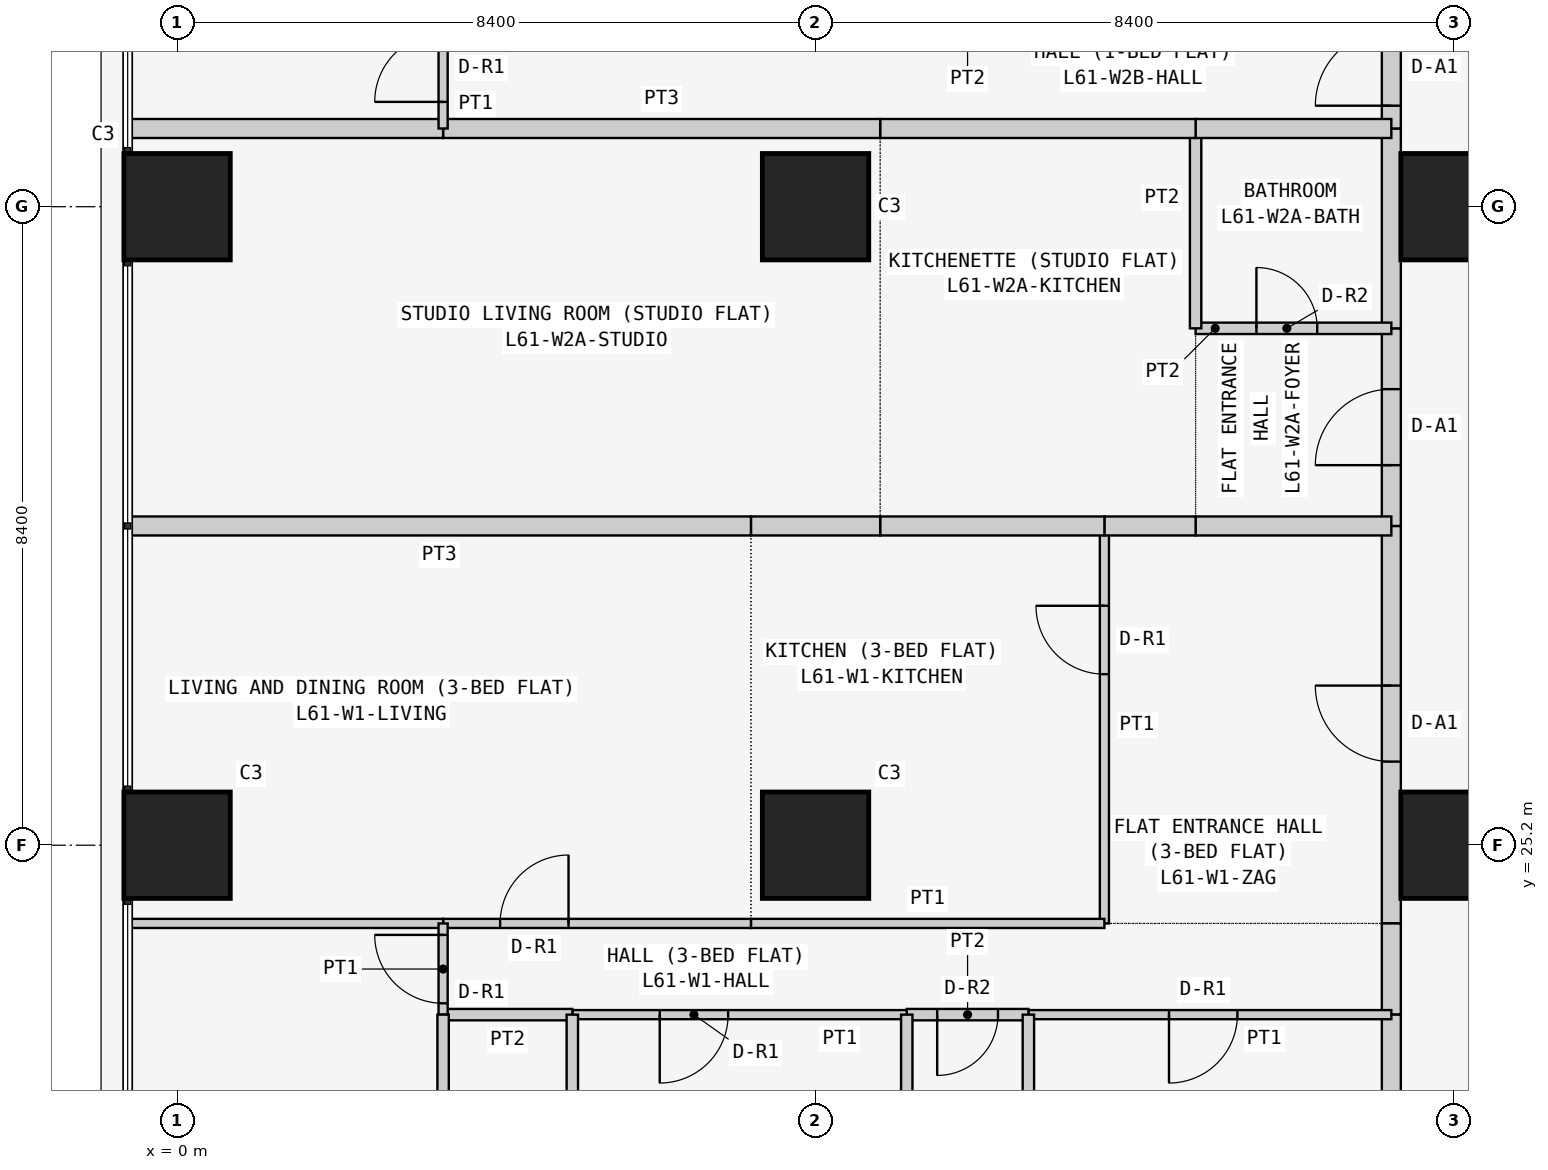
"""IFC4 building model, lengths in metres.
Left out: names, types, materials, properties, quantities, classifications, styles, units other than length and angle.
Written with IfcOpenShell. Run it as: python <this file> out.ifc"""

import sys

from ifc_helpers import new_model, si_unit, direction, frame, frame_2d, origin, origin_2d, place, context, subcontext, project, spatial, rectangle, extrude, element, fill, save


model = new_model("IFC4")
c1 = context("Model", 3, precision=1e-05, world=origin(), true_north=direction((0.0, 1.0)))
c2 = subcontext(c1, "Body", "Model", "MODEL_VIEW")
j1 = project(units=[si_unit("LENGTHUNIT", "METRE"), si_unit("PLANEANGLEUNIT", "RADIAN")], contexts=[c1])
p1 = place(None, origin())
s1 = spatial("IfcSite", under=j1, at=p1, CompositionType="ELEMENT")
p2 = place(p1, origin())
s2 = spatial("IfcBuilding", under=s1, at=p2, CompositionType="ELEMENT")
p3 = place(p2, frame((0.0, 0.0, 233.7)))
s3 = spatial("IfcBuildingStorey", under=s2, at=p3, CompositionType="ELEMENT", Elevation=233.7)
for number, where, z_axis, x_axis in (
    (1, (0.0, 25.2, 0.0), (0.0, 0.0, 1.0), (1.0, 0.0, 0.0)),
    (2, (0.0, 33.6, 0.0), (0.0, 0.0, 1.0), (1.0, 0.0, 0.0)),
    (3, (8.4, 25.2, 0.0), (0.0, 0.0, 1.0), (1.0, 0.0, 0.0)),
    (4, (8.4, 33.6, 0.0), (0.0, 0.0, 1.0), (1.0, 0.0, 0.0)),
    (5, (16.8, 25.2, 0.0), (0.0, 0.0, 1.0), (1.0, 0.0, 0.0)),
    (6, (16.8, 33.6, 0.0), (0.0, 0.0, 1.0), (1.0, 0.0, 0.0)),
):
    element("IfcColumn", number, at=place(p3, frame(where, z_axis=z_axis, x_axis=x_axis)), inside=s3, PredefinedType="COLUMN", context=c2, shape_type="SweptSolid", body=[
        extrude(rectangle(XDim=1.4, YDim=1.4, at=origin_2d()), origin(), (0.0, 0.0, 1.0), 3.6),
    ])
p4 = place(p3, frame((15.975, 24.171, 0.0), z_axis=(0.0, 0.0, 1.0), x_axis=(0.0, 1.0, 0.0)))
e7 = element("IfcWall", 7, at=p4, inside=s3, PredefinedType="PARTITIONING", context=c2, shape_type="SweptSolid", body=[
    extrude(rectangle(XDim=5.229, YDim=0.25, at=frame_2d((2.615, 0.0))), origin(), (0.0, 0.0, 1.0), 3.45),
])
p5 = place(p4, frame((2.129, 0.0, 0.0)))
e8 = element("IfcOpeningElement", 8, at=p5, cuts=e7, PredefinedType="OPENING", context=c2, shape_type="SweptSolid", body=[
    extrude(rectangle(XDim=1.0, YDim=2.1, at=frame_2d((0.5, 1.05))), frame((0.0, 0.135, 0.0), z_axis=(0.0, -1.0, 0.0), x_axis=(1.0, 0.0, 0.0)), (0.0, 0.0, 1.0), 0.27),
])
p6 = place(p3, frame((15.975, 22.971, 0.0), z_axis=(0.0, 0.0, 1.0), x_axis=(0.0, 1.0, 0.0)))
e9 = element("IfcWall", 9, at=p6, inside=s3, PredefinedType="PARTITIONING", context=c2, shape_type="SweptSolid", body=[
    extrude(rectangle(XDim=1.2, YDim=0.25, at=frame_2d((0.6, 0.0))), origin(), (0.0, 0.0, 1.0), 3.45),
])
p7 = place(p3, frame((15.975, 16.1, 0.0), z_axis=(0.0, 0.0, 1.0), x_axis=(0.0, 1.0, 0.0)))
e10 = element("IfcWall", 10, at=p7, inside=s3, PredefinedType="PARTITIONING", context=c2, shape_type="SweptSolid", body=[
    extrude(rectangle(XDim=6.871, YDim=0.25, at=frame_2d((3.436, 0.0))), origin(), (0.0, 0.0, 1.0), 3.45),
])
p8 = place(p3, frame((15.975, 29.4, 0.0), z_axis=(0.0, 0.0, 1.0), x_axis=(0.0, 1.0, 0.0)))
e11 = element("IfcWall", 11, at=p8, inside=s3, PredefinedType="PARTITIONING", context=c2, shape_type="SweptSolid", body=[
    extrude(rectangle(XDim=2.6, YDim=0.25, at=frame_2d((1.3, 0.0))), origin(), (0.0, 0.0, 1.0), 3.45),
])
p9 = place(p8, frame((0.8, 0.0, 0.0)))
e12 = element("IfcOpeningElement", 12, at=p9, cuts=e11, PredefinedType="OPENING", context=c2, shape_type="SweptSolid", body=[
    extrude(rectangle(XDim=1.0, YDim=2.1, at=frame_2d((0.5, 1.05))), frame((0.0, 0.135, 0.0), z_axis=(0.0, -1.0, 0.0), x_axis=(1.0, 0.0, 0.0)), (0.0, 0.0, 1.0), 0.27),
])
p10 = place(p3, frame((15.975, 32.0, 0.0), z_axis=(0.0, 0.0, 1.0), x_axis=(0.0, 1.0, 0.0)))
e13 = element("IfcWall", 13, at=p10, inside=s3, PredefinedType="PARTITIONING", context=c2, shape_type="SweptSolid", body=[
    extrude(rectangle(XDim=2.629, YDim=0.25, at=frame_2d((1.314, 0.0))), origin(), (0.0, 0.0, 1.0), 3.45),
])
p11 = place(p3, frame((15.975, 34.629, 0.0), z_axis=(0.0, 0.0, 1.0), x_axis=(0.0, 1.0, 0.0)))
e14 = element("IfcWall", 14, at=p11, inside=s3, PredefinedType="PARTITIONING", context=c2, shape_type="SweptSolid", body=[
    extrude(rectangle(XDim=1.6, YDim=0.25, at=frame_2d((0.8, 0.0))), origin(), (0.0, 0.0, 1.0), 3.45),
])
p12 = place(p11, frame((0.3, 0.0, 0.0)))
e15 = element("IfcOpeningElement", 15, at=p12, cuts=e14, PredefinedType="OPENING", context=c2, shape_type="SweptSolid", body=[
    extrude(rectangle(XDim=1.0, YDim=2.1, at=frame_2d((0.5, 1.05))), frame((0.0, 0.135, 0.0), z_axis=(0.0, -1.0, 0.0), x_axis=(1.0, 0.0, 0.0)), (0.0, 0.0, 1.0), 0.27),
])
p13 = place(p3, frame((12.2, 29.4, 0.0), z_axis=(0.0, 0.0, 1.0), x_axis=(0.0, -1.0, 0.0)))
e16 = element("IfcWall", 16, at=p13, inside=s3, PredefinedType="PARTITIONING", context=c2, shape_type="SweptSolid", body=[
    extrude(rectangle(XDim=5.229, YDim=0.12, at=frame_2d((2.615, 0.0))), origin(), (0.0, 0.0, 1.0), 3.45),
])
p14 = place(p13, frame((1.05, 0.0, 0.0)))
e17 = element("IfcOpeningElement", 17, at=p14, cuts=e16, PredefinedType="OPENING", context=c2, shape_type="SweptSolid", body=[
    extrude(rectangle(XDim=0.9, YDim=2.1, at=frame_2d((0.45, 1.05))), frame((0.0, 0.07, 0.0), z_axis=(0.0, -1.0, 0.0), x_axis=(1.0, 0.0, 0.0)), (0.0, 0.0, 1.0), 0.14),
])
p15 = place(p3, frame((15.975, 29.4, 0.0), z_axis=(0.0, 0.0, 1.0), x_axis=(-1.0, 0.0, 0.0)))
e18 = element("IfcWall", 18, at=p15, inside=s3, PredefinedType="PARTITIONING", context=c2, shape_type="SweptSolid", body=[
    extrude(rectangle(XDim=2.575, YDim=0.25, at=frame_2d((1.288, 0.0))), origin(), (0.0, 0.0, 1.0), 3.45),
])
p16 = place(p3, frame((13.4, 29.4, 0.0), z_axis=(0.0, 0.0, 1.0), x_axis=(-1.0, 0.0, 0.0)))
e19 = element("IfcWall", 19, at=p16, inside=s3, PredefinedType="PARTITIONING", context=c2, shape_type="SweptSolid", body=[
    extrude(rectangle(XDim=1.2, YDim=0.25, at=frame_2d((0.6, 0.0))), origin(), (0.0, 0.0, 1.0), 3.45),
])
p17 = place(p3, frame((7.55, 24.171, 0.0), z_axis=(0.0, 0.0, 1.0), x_axis=(1.0, 0.0, 0.0)))
e20 = element("IfcWall", 20, at=p17, inside=s3, PredefinedType="PARTITIONING", context=c2, shape_type="SweptSolid", body=[
    extrude(rectangle(XDim=4.65, YDim=0.12, at=frame_2d((2.325, 0.0))), origin(), (0.0, 0.0, 1.0), 3.45),
])
p18 = place(p3, frame((12.2, 29.4, 0.0), z_axis=(0.0, 0.0, 1.0), x_axis=(-1.0, 0.0, 0.0)))
e21 = element("IfcWall", 21, at=p18, inside=s3, PredefinedType="PARTITIONING", context=c2, shape_type="SweptSolid", body=[
    extrude(rectangle(XDim=2.95, YDim=0.25, at=frame_2d((1.475, 0.0))), origin(), (0.0, 0.0, 1.0), 3.45),
])
p19 = place(p3, frame((9.25, 29.4, 0.0), z_axis=(0.0, 0.0, 1.0), x_axis=(-1.0, 0.0, 0.0)))
e22 = element("IfcWall", 22, at=p19, inside=s3, PredefinedType="PARTITIONING", context=c2, shape_type="SweptSolid", body=[
    extrude(rectangle(XDim=1.7, YDim=0.25, at=frame_2d((0.85, 0.0))), origin(), (0.0, 0.0, 1.0), 3.45),
])
p20 = place(p3, frame((3.5, 24.171, 0.0), z_axis=(0.0, 0.0, 1.0), x_axis=(1.0, 0.0, 0.0)))
e23 = element("IfcWall", 23, at=p20, inside=s3, PredefinedType="PARTITIONING", context=c2, shape_type="SweptSolid", body=[
    extrude(rectangle(XDim=4.05, YDim=0.12, at=frame_2d((2.025, 0.0))), origin(), (0.0, 0.0, 1.0), 3.45),
])
p21 = place(p20, frame((0.75, 0.0, 0.0)))
e24 = element("IfcOpeningElement", 24, at=p21, cuts=e23, PredefinedType="OPENING", context=c2, shape_type="SweptSolid", body=[
    extrude(rectangle(XDim=0.9, YDim=2.1, at=frame_2d((0.45, 1.05))), frame((0.0, 0.07, 0.0), z_axis=(0.0, -1.0, 0.0), x_axis=(1.0, 0.0, 0.0)), (0.0, 0.0, 1.0), 0.14),
])
p22 = place(p3, frame((-0.65, 24.171, 0.0), z_axis=(0.0, 0.0, 1.0), x_axis=(1.0, 0.0, 0.0)))
e25 = element("IfcWall", 25, at=p22, inside=s3, PredefinedType="PARTITIONING", context=c2, shape_type="SweptSolid", body=[
    extrude(rectangle(XDim=4.15, YDim=0.12, at=frame_2d((2.075, 0.0))), origin(), (0.0, 0.0, 1.0), 3.45),
])
p23 = place(p3, frame((7.55, 29.4, 0.0), z_axis=(0.0, 0.0, 1.0), x_axis=(-1.0, 0.0, 0.0)))
e26 = element("IfcWall", 26, at=p23, inside=s3, PredefinedType="PARTITIONING", context=c2, shape_type="SweptSolid", body=[
    extrude(rectangle(XDim=8.2, YDim=0.25, at=frame_2d((4.1, 0.0))), origin(), (0.0, 0.0, 1.0), 3.45),
])
p24 = place(p3, frame((11.2, 22.971, 0.0), z_axis=(0.0, 0.0, 1.0), x_axis=(1.0, 0.0, 0.0)))
e27 = element("IfcWall", 27, at=p24, inside=s3, PredefinedType="PARTITIONING", context=c2, shape_type="SweptSolid", body=[
    extrude(rectangle(XDim=4.775, YDim=0.12, at=frame_2d((2.388, 0.0))), origin(), (0.0, 0.0, 1.0), 3.45),
])
p25 = place(p24, frame((1.85, 0.0, 0.0)))
e28 = element("IfcOpeningElement", 28, at=p25, cuts=e27, PredefinedType="OPENING", context=c2, shape_type="SweptSolid", body=[
    extrude(rectangle(XDim=0.9, YDim=2.1, at=frame_2d((0.45, 1.05))), frame((0.0, 0.07, 0.0), z_axis=(0.0, -1.0, 0.0), x_axis=(1.0, 0.0, 0.0)), (0.0, 0.0, 1.0), 0.14),
])
p26 = place(p3, frame((9.6, 22.971, 0.0), z_axis=(0.0, 0.0, 1.0), x_axis=(1.0, 0.0, 0.0)))
e29 = element("IfcWall", 29, at=p26, inside=s3, PredefinedType="PARTITIONING", context=c2, shape_type="SweptSolid", body=[
    extrude(rectangle(XDim=1.6, YDim=0.15, at=frame_2d((0.8, 0.0))), origin(), (0.0, 0.0, 1.0), 3.45),
])
p27 = place(p26, frame((0.4, 0.0, 0.0)))
e30 = element("IfcOpeningElement", 30, at=p27, cuts=e29, PredefinedType="OPENING", context=c2, shape_type="SweptSolid", body=[
    extrude(rectangle(XDim=0.8, YDim=2.1, at=frame_2d((0.4, 1.05))), frame((0.0, 0.085, 0.0), z_axis=(0.0, -1.0, 0.0), x_axis=(1.0, 0.0, 0.0)), (0.0, 0.0, 1.0), 0.17),
])
p28 = place(p3, frame((5.2, 22.971, 0.0), z_axis=(0.0, 0.0, 1.0), x_axis=(1.0, 0.0, 0.0)))
e31 = element("IfcWall", 31, at=p28, inside=s3, PredefinedType="PARTITIONING", context=c2, shape_type="SweptSolid", body=[
    extrude(rectangle(XDim=4.4, YDim=0.12, at=frame_2d((2.2, 0.0))), origin(), (0.0, 0.0, 1.0), 3.45),
])
p29 = place(p28, frame((1.15, 0.0, 0.0)))
e32 = element("IfcOpeningElement", 32, at=p29, cuts=e31, PredefinedType="OPENING", context=c2, shape_type="SweptSolid", body=[
    extrude(rectangle(XDim=0.9, YDim=2.1, at=frame_2d((0.45, 1.05))), frame((0.0, 0.07, 0.0), z_axis=(0.0, -1.0, 0.0), x_axis=(1.0, 0.0, 0.0)), (0.0, 0.0, 1.0), 0.14),
])
p30 = place(p3, frame((3.5, 22.971, 0.0), z_axis=(0.0, 0.0, 1.0), x_axis=(1.0, 0.0, 0.0)))
e33 = element("IfcWall", 33, at=p30, inside=s3, PredefinedType="PARTITIONING", context=c2, shape_type="SweptSolid", body=[
    extrude(rectangle(XDim=1.7, YDim=0.15, at=frame_2d((0.85, 0.0))), origin(), (0.0, 0.0, 1.0), 3.45),
])
p31 = place(p3, frame((3.5, 24.171, 0.0), z_axis=(0.0, 0.0, 1.0), x_axis=(0.0, -1.0, 0.0)))
e34 = element("IfcWall", 34, at=p31, inside=s3, PredefinedType="PARTITIONING", context=c2, shape_type="SweptSolid", body=[
    extrude(rectangle(XDim=1.2, YDim=0.12, at=frame_2d((0.6, 0.0))), origin(), (0.0, 0.0, 1.0), 3.45),
])
p32 = place(p31, frame((0.151, 0.0, 0.0)))
e35 = element("IfcOpeningElement", 35, at=p32, cuts=e34, PredefinedType="OPENING", context=c2, shape_type="SweptSolid", body=[
    extrude(rectangle(XDim=0.9, YDim=2.1, at=frame_2d((0.45, 1.05))), frame((0.0, 0.07, 0.0), z_axis=(0.0, -1.0, 0.0), x_axis=(1.0, 0.0, 0.0)), (0.0, 0.0, 1.0), 0.14),
])
for number, where, z_axis, x_axis in (
    (36, (11.2, 22.971, 0.0), (0.0, 0.0, 1.0), (0.0, -1.0, 0.0)),
    (37, (9.6, 22.971, 0.0), (0.0, 0.0, 1.0), (0.0, -1.0, 0.0)),
    (38, (5.2, 22.971, 0.0), (0.0, 0.0, 1.0), (0.0, -1.0, 0.0)),
):
    element("IfcWall", number, at=place(p3, frame(where, z_axis=z_axis, x_axis=x_axis)), inside=s3, PredefinedType="PARTITIONING", context=c2, shape_type="SweptSolid", body=[
        extrude(rectangle(XDim=6.871, YDim=0.15, at=frame_2d((3.436, 0.0))), origin(), (0.0, 0.0, 1.0), 3.45),
    ])
p33 = place(p3, frame((3.5, 22.971, 0.0), z_axis=(0.0, 0.0, 1.0), x_axis=(0.0, -1.0, 0.0)))
e39 = element("IfcWall", 39, at=p33, inside=s3, PredefinedType="PARTITIONING", context=c2, shape_type="SweptSolid", body=[
    extrude(rectangle(XDim=6.871, YDim=0.15, at=frame_2d((3.436, 0.0))), origin(), (0.0, 0.0, 1.0), 3.45),
])
p34 = place(p33, frame((3.171, 0.0, 0.0)))
e40 = element("IfcOpeningElement", 40, at=p34, cuts=e39, PredefinedType="OPENING", context=c2, shape_type="SweptSolid", body=[
    extrude(rectangle(XDim=0.8, YDim=2.1, at=frame_2d((0.4, 1.05))), frame((0.0, 0.085, 0.0), z_axis=(0.0, -1.0, 0.0), x_axis=(1.0, 0.0, 0.0)), (0.0, 0.0, 1.0), 0.17),
])
p35 = place(p3, frame((13.4, 32.0, 0.0), z_axis=(0.0, 0.0, 1.0), x_axis=(1.0, 0.0, 0.0)))
e41 = element("IfcWall", 41, at=p35, inside=s3, PredefinedType="PARTITIONING", context=c2, shape_type="SweptSolid", body=[
    extrude(rectangle(XDim=2.575, YDim=0.15, at=frame_2d((1.288, 0.0))), origin(), (0.0, 0.0, 1.0), 3.45),
])
p36 = place(p35, frame((0.8, 0.0, 0.0)))
e42 = element("IfcOpeningElement", 42, at=p36, cuts=e41, PredefinedType="OPENING", context=c2, shape_type="SweptSolid", body=[
    extrude(rectangle(XDim=0.8, YDim=2.1, at=frame_2d((0.4, 1.05))), frame((0.0, 0.085, 0.0), z_axis=(0.0, -1.0, 0.0), x_axis=(1.0, 0.0, 0.0)), (0.0, 0.0, 1.0), 0.17),
])
p37 = place(p3, frame((13.4, 32.0, 0.0), z_axis=(0.0, 0.0, 1.0), x_axis=(0.0, 1.0, 0.0)))
e43 = element("IfcWall", 43, at=p37, inside=s3, PredefinedType="PARTITIONING", context=c2, shape_type="SweptSolid", body=[
    extrude(rectangle(XDim=2.629, YDim=0.15, at=frame_2d((1.314, 0.0))), origin(), (0.0, 0.0, 1.0), 3.45),
])
p38 = place(p3, frame((13.4, 34.629, 0.0), z_axis=(0.0, 0.0, 1.0), x_axis=(1.0, 0.0, 0.0)))
e44 = element("IfcWall", 44, at=p38, inside=s3, PredefinedType="PARTITIONING", context=c2, shape_type="SweptSolid", body=[
    extrude(rectangle(XDim=2.575, YDim=0.25, at=frame_2d((1.288, 0.0))), origin(), (0.0, 0.0, 1.0), 3.45),
])
p39 = place(p3, frame((9.25, 34.629, 0.0), z_axis=(0.0, 0.0, 1.0), x_axis=(1.0, 0.0, 0.0)))
e45 = element("IfcWall", 45, at=p39, inside=s3, PredefinedType="PARTITIONING", context=c2, shape_type="SweptSolid", body=[
    extrude(rectangle(XDim=4.15, YDim=0.25, at=frame_2d((2.075, 0.0))), origin(), (0.0, 0.0, 1.0), 3.45),
])
p40 = place(p3, frame((3.5, 34.629, 0.0), z_axis=(0.0, 0.0, 1.0), x_axis=(1.0, 0.0, 0.0)))
e46 = element("IfcWall", 46, at=p40, inside=s3, PredefinedType="PARTITIONING", context=c2, shape_type="SweptSolid", body=[
    extrude(rectangle(XDim=5.75, YDim=0.25, at=frame_2d((2.875, 0.0))), origin(), (0.0, 0.0, 1.0), 3.45),
])
p41 = place(p3, frame((-0.65, 34.629, 0.0), z_axis=(0.0, 0.0, 1.0), x_axis=(1.0, 0.0, 0.0)))
e47 = element("IfcWall", 47, at=p41, inside=s3, PredefinedType="PARTITIONING", context=c2, shape_type="SweptSolid", body=[
    extrude(rectangle(XDim=4.15, YDim=0.25, at=frame_2d((2.075, 0.0))), origin(), (0.0, 0.0, 1.0), 3.45),
])
p42 = place(p3, frame((3.5, 34.629, 0.0), z_axis=(0.0, 0.0, 1.0), x_axis=(0.0, 1.0, 0.0)))
e48 = element("IfcWall", 48, at=p42, inside=s3, PredefinedType="PARTITIONING", context=c2, shape_type="SweptSolid", body=[
    extrude(rectangle(XDim=1.6, YDim=0.12, at=frame_2d((0.8, 0.0))), origin(), (0.0, 0.0, 1.0), 3.45),
])
p43 = place(p42, frame((0.35, 0.0, 0.0)))
e49 = element("IfcOpeningElement", 49, at=p43, cuts=e48, PredefinedType="OPENING", context=c2, shape_type="SweptSolid", body=[
    extrude(rectangle(XDim=0.9, YDim=2.1, at=frame_2d((0.45, 1.05))), frame((0.0, 0.07, 0.0), z_axis=(0.0, -1.0, 0.0), x_axis=(1.0, 0.0, 0.0)), (0.0, 0.0, 1.0), 0.14),
])
p44 = place(p5, origin())
e50 = element("IfcDoor", 50, at=p44, inside=s3, OperationType="SINGLE_SWING_RIGHT", PredefinedType="DOOR", context=c2, shape_type="SweptSolid", body=[
    extrude(rectangle(XDim=1.0, YDim=2.1, at=frame_2d((0.5, 1.05))), frame((0.0, 0.025, 0.0), z_axis=(0.0, -1.0, 0.0), x_axis=(1.0, 0.0, 0.0)), (0.0, 0.0, 1.0), 0.05),
])
fill(e8, e50)
p45 = place(p14, frame((0.9, 0.0, 0.0), z_axis=(0.0, 0.0, 1.0), x_axis=(-1.0, 0.0, 0.0)))
e51 = element("IfcDoor", 51, at=p45, inside=s3, OperationType="SINGLE_SWING_RIGHT", PredefinedType="DOOR", context=c2, shape_type="SweptSolid", body=[
    extrude(rectangle(XDim=0.9, YDim=2.1, at=frame_2d((0.45, 1.05))), frame((0.0, 0.025, 0.0), z_axis=(0.0, -1.0, 0.0), x_axis=(1.0, 0.0, 0.0)), (0.0, 0.0, 1.0), 0.05),
])
fill(e17, e51)
p46 = place(p21, origin())
e52 = element("IfcDoor", 52, at=p46, inside=s3, OperationType="SINGLE_SWING_RIGHT", PredefinedType="DOOR", context=c2, shape_type="SweptSolid", body=[
    extrude(rectangle(XDim=0.9, YDim=2.1, at=frame_2d((0.45, 1.05))), frame((0.0, 0.025, 0.0), z_axis=(0.0, -1.0, 0.0), x_axis=(1.0, 0.0, 0.0)), (0.0, 0.0, 1.0), 0.05),
])
fill(e24, e52)
p47 = place(p25, frame((0.9, 0.0, 0.0), z_axis=(0.0, 0.0, 1.0), x_axis=(-1.0, 0.0, 0.0)))
e53 = element("IfcDoor", 53, at=p47, inside=s3, OperationType="SINGLE_SWING_RIGHT", PredefinedType="DOOR", context=c2, shape_type="SweptSolid", body=[
    extrude(rectangle(XDim=0.9, YDim=2.1, at=frame_2d((0.45, 1.05))), frame((0.0, 0.025, 0.0), z_axis=(0.0, -1.0, 0.0), x_axis=(1.0, 0.0, 0.0)), (0.0, 0.0, 1.0), 0.05),
])
fill(e28, e53)
p48 = place(p27, frame((0.8, 0.0, 0.0), z_axis=(0.0, 0.0, 1.0), x_axis=(-1.0, 0.0, 0.0)))
e54 = element("IfcDoor", 54, at=p48, inside=s3, OperationType="SINGLE_SWING_RIGHT", PredefinedType="DOOR", context=c2, shape_type="SweptSolid", body=[
    extrude(rectangle(XDim=0.8, YDim=2.1, at=frame_2d((0.4, 1.05))), frame((0.0, 0.025, 0.0), z_axis=(0.0, -1.0, 0.0), x_axis=(1.0, 0.0, 0.0)), (0.0, 0.0, 1.0), 0.05),
])
fill(e30, e54)
p49 = place(p29, frame((0.9, 0.0, 0.0), z_axis=(0.0, 0.0, 1.0), x_axis=(-1.0, 0.0, 0.0)))
e55 = element("IfcDoor", 55, at=p49, inside=s3, OperationType="SINGLE_SWING_RIGHT", PredefinedType="DOOR", context=c2, shape_type="SweptSolid", body=[
    extrude(rectangle(XDim=0.9, YDim=2.1, at=frame_2d((0.45, 1.05))), frame((0.0, 0.025, 0.0), z_axis=(0.0, -1.0, 0.0), x_axis=(1.0, 0.0, 0.0)), (0.0, 0.0, 1.0), 0.05),
])
fill(e32, e55)
p50 = place(p32, frame((0.9, 0.0, 0.0), z_axis=(0.0, 0.0, 1.0), x_axis=(-1.0, 0.0, 0.0)))
e56 = element("IfcDoor", 56, at=p50, inside=s3, OperationType="SINGLE_SWING_RIGHT", PredefinedType="DOOR", context=c2, shape_type="SweptSolid", body=[
    extrude(rectangle(XDim=0.9, YDim=2.1, at=frame_2d((0.45, 1.05))), frame((0.0, 0.025, 0.0), z_axis=(0.0, -1.0, 0.0), x_axis=(1.0, 0.0, 0.0)), (0.0, 0.0, 1.0), 0.05),
])
fill(e35, e56)
p51 = place(p9, origin())
e57 = element("IfcDoor", 57, at=p51, inside=s3, OperationType="SINGLE_SWING_LEFT", PredefinedType="DOOR", context=c2, shape_type="SweptSolid", body=[
    extrude(rectangle(XDim=1.0, YDim=2.1, at=frame_2d((0.5, 1.05))), frame((0.0, 0.025, 0.0), z_axis=(0.0, -1.0, 0.0), x_axis=(1.0, 0.0, 0.0)), (0.0, 0.0, 1.0), 0.05),
])
fill(e12, e57)
p52 = place(p36, origin())
e58 = element("IfcDoor", 58, at=p52, inside=s3, OperationType="SINGLE_SWING_LEFT", PredefinedType="DOOR", context=c2, shape_type="SweptSolid", body=[
    extrude(rectangle(XDim=0.8, YDim=2.1, at=frame_2d((0.4, 1.05))), frame((0.0, 0.025, 0.0), z_axis=(0.0, -1.0, 0.0), x_axis=(1.0, 0.0, 0.0)), (0.0, 0.0, 1.0), 0.05),
])
fill(e42, e58)
p53 = place(p12, origin())
e59 = element("IfcDoor", 59, at=p53, inside=s3, OperationType="SINGLE_SWING_LEFT", PredefinedType="DOOR", context=c2, shape_type="SweptSolid", body=[
    extrude(rectangle(XDim=1.0, YDim=2.1, at=frame_2d((0.5, 1.05))), frame((0.0, 0.025, 0.0), z_axis=(0.0, -1.0, 0.0), x_axis=(1.0, 0.0, 0.0)), (0.0, 0.0, 1.0), 0.05),
])
fill(e15, e59)
p54 = place(p43, origin())
e60 = element("IfcDoor", 60, at=p54, inside=s3, OperationType="SINGLE_SWING_LEFT", PredefinedType="DOOR", context=c2, shape_type="SweptSolid", body=[
    extrude(rectangle(XDim=0.9, YDim=2.1, at=frame_2d((0.45, 1.05))), frame((0.0, 0.025, 0.0), z_axis=(0.0, -1.0, 0.0), x_axis=(1.0, 0.0, 0.0)), (0.0, 0.0, 1.0), 0.05),
])
fill(e49, e60)
save(model, sys.argv[1])
